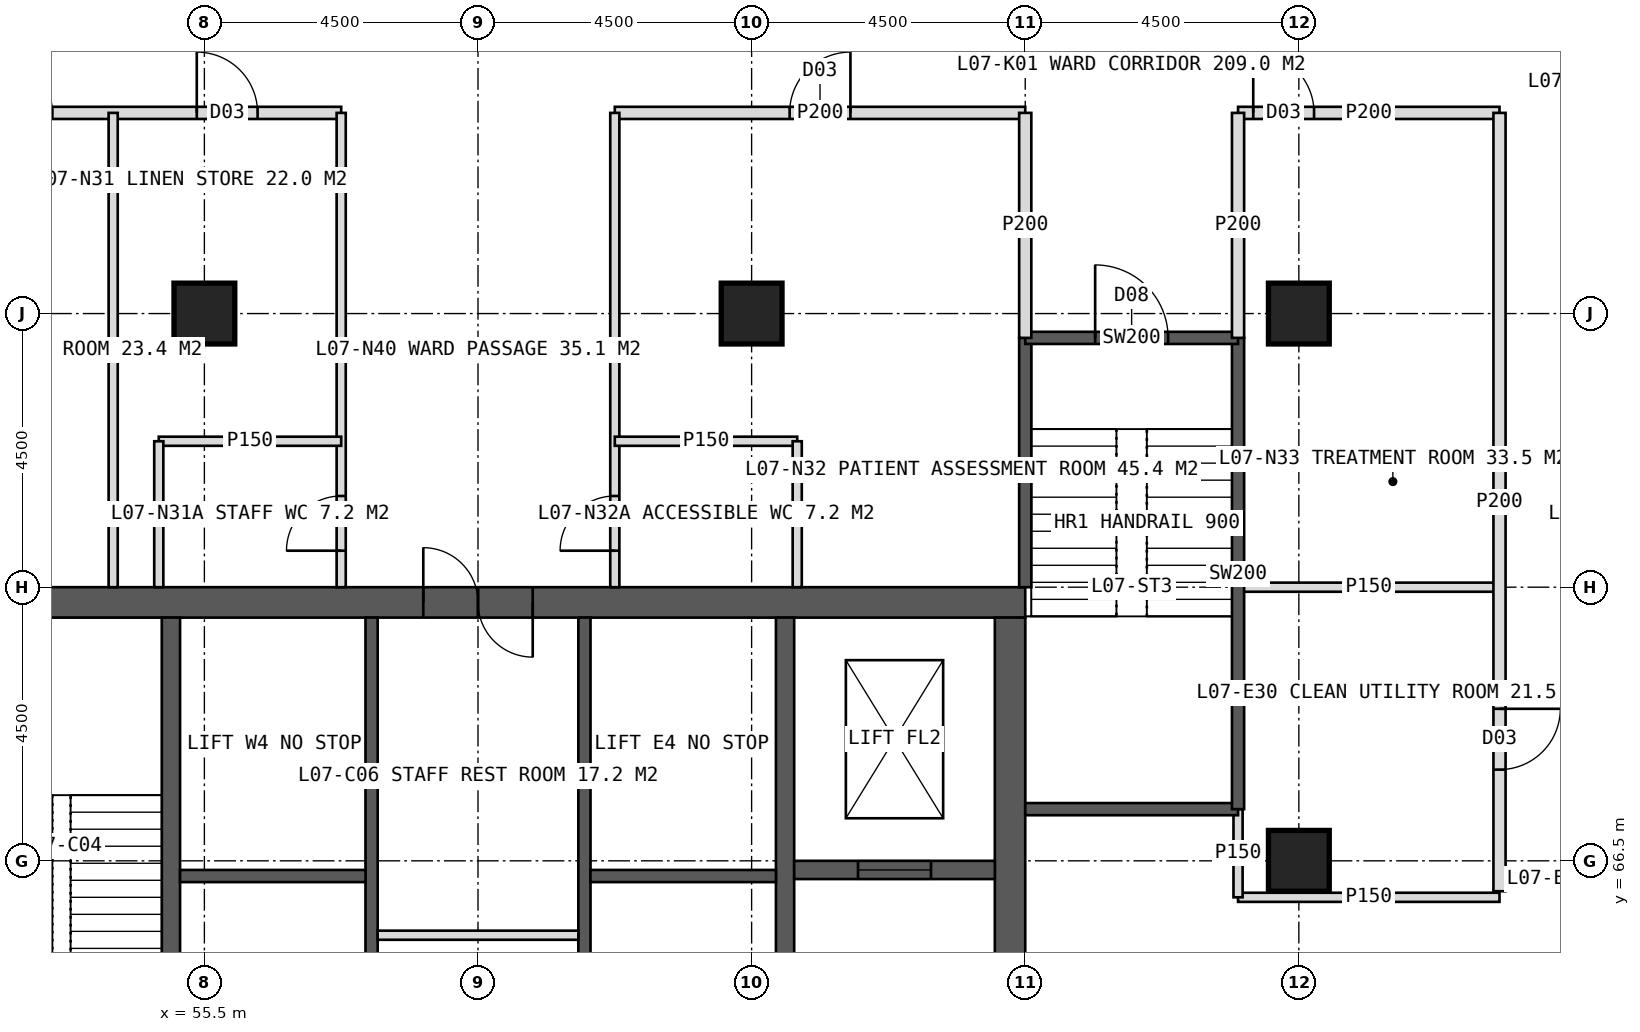
"""IFC4 building model, lengths in metres.
Left out: names, types, materials, properties, quantities, classifications, styles, units other than length and angle.
Written with IfcOpenShell. Run it as: python <this file> out.ifc"""

import sys

from ifc_helpers import new_model, si_unit, direction, frame, frame_2d, origin, origin_2d, place, context, subcontext, project, spatial, rectangle, hollow_rectangle, extrude, element, fill, save


model = new_model("IFC4")
c1 = context("Model", 3, precision=1e-05, world=origin(), true_north=direction((0.0, 1.0)))
c2 = subcontext(c1, "Body", "Model", "MODEL_VIEW")
j1 = project(units=[si_unit("LENGTHUNIT", "METRE"), si_unit("PLANEANGLEUNIT", "RADIAN")], contexts=[c1])
p1 = place(None, origin())
s1 = spatial("IfcSite", under=j1, at=p1, CompositionType="ELEMENT")
p2 = place(p1, origin())
s2 = spatial("IfcBuilding", under=s1, at=p2, CompositionType="ELEMENT")
p3 = place(p2, frame((0.0, 0.0, 35.0)))
s3 = spatial("IfcBuildingStorey", under=s2, at=p3, CompositionType="ELEMENT", Elevation=35.0)
p4 = place(p3, frame((51.0, 70.75, 0.0), z_axis=(0.0, 0.0, 1.0), x_axis=(1.0, 0.0, 0.0)))
e1 = element("IfcWall", 1, at=p4, inside=s3, PredefinedType="SHEAR", context=c2, shape_type="SweptSolid", body=[
    extrude(rectangle(XDim=18.0, YDim=0.5, at=frame_2d((9.0, 0.0))), origin(), (0.0, 0.0, 1.0), 4.0),
])
p5 = place(p4, frame((8.1, 0.0, 0.0)))
e2 = element("IfcOpeningElement", 2, at=p5, cuts=e1, PredefinedType="OPENING", context=c2, shape_type="SweptSolid", body=[
    extrude(rectangle(XDim=1.8, YDim=2.2, at=frame_2d((0.9, 1.1))), frame((0.0, 0.26, 0.0), z_axis=(0.0, -1.0, 0.0), x_axis=(1.0, 0.0, 0.0)), (0.0, 0.0, 1.0), 0.52),
])
p6 = place(p3, frame((68.75, 53.5, 0.0), z_axis=(0.0, 0.0, 1.0), x_axis=(0.0, 1.0, 0.0)))
e3 = element("IfcWall", 3, at=p6, inside=s3, PredefinedType="SHEAR", context=c2, shape_type="SweptSolid", body=[
    extrude(rectangle(XDim=17.0, YDim=0.5, at=frame_2d((8.5, 0.0))), origin(), (0.0, 0.0, 1.0), 4.0),
])
p7 = place(p6, frame((9.5, 0.0, 0.0)))
e4 = element("IfcOpeningElement", 4, at=p7, cuts=e3, PredefinedType="OPENING", context=c2, shape_type="SweptSolid", body=[
    extrude(rectangle(XDim=1.5, YDim=2.2, at=frame_2d((0.75, 1.1))), frame((0.0, 0.26, 0.0), z_axis=(0.0, -1.0, 0.0), x_axis=(1.0, 0.0, 0.0)), (0.0, 0.0, 1.0), 0.52),
])
for number, where, z_axis, x_axis in (
    (5, (54.95, 53.5, 0.0), (0.0, 0.0, 1.0), (0.0, 1.0, 0.0)),
    (6, (65.05, 53.5, 0.0), (0.0, 0.0, 1.0), (0.0, 1.0, 0.0)),
):
    element("IfcWall", number, at=place(p3, frame(where, z_axis=z_axis, x_axis=x_axis)), inside=s3, PredefinedType="SHEAR", context=c2, shape_type="SweptSolid", body=[
        extrude(rectangle(XDim=17.0, YDim=0.3, at=frame_2d((8.5, 0.0))), origin(), (0.0, 0.0, 1.0), 4.0),
    ])
p8 = place(p3, frame((58.25, 53.5, 0.0), z_axis=(0.0, 0.0, 1.0), x_axis=(0.0, 1.0, 0.0)))
e7 = element("IfcWall", 7, at=p8, inside=s3, PredefinedType="SHEAR", context=c2, shape_type="SweptSolid", body=[
    extrude(rectangle(XDim=17.0, YDim=0.2, at=frame_2d((8.5, 0.0))), origin(), (0.0, 0.0, 1.0), 4.0),
])
p9 = place(p8, frame((1.375, 0.0, 0.0)))
e8 = element("IfcOpeningElement", 8, at=p9, cuts=e7, PredefinedType="OPENING", context=c2, shape_type="SweptSolid", body=[
    extrude(rectangle(XDim=1.4, YDim=2.2, at=frame_2d((0.7, 1.1))), frame((0.0, 0.11, 0.0), z_axis=(0.0, -1.0, 0.0), x_axis=(1.0, 0.0, 0.0)), (0.0, 0.0, 1.0), 0.22),
])
p10 = place(p8, frame((5.675, 0.0, 0.0)))
e9 = element("IfcOpeningElement", 9, at=p10, cuts=e7, PredefinedType="OPENING", context=c2, shape_type="SweptSolid", body=[
    extrude(rectangle(XDim=1.4, YDim=2.2, at=frame_2d((0.7, 1.1))), frame((0.0, 0.11, 0.0), z_axis=(0.0, -1.0, 0.0), x_axis=(1.0, 0.0, 0.0)), (0.0, 0.0, 1.0), 0.22),
])
p11 = place(p3, frame((61.75, 53.5, 0.0), z_axis=(0.0, 0.0, 1.0), x_axis=(0.0, 1.0, 0.0)))
e10 = element("IfcWall", 10, at=p11, inside=s3, PredefinedType="SHEAR", context=c2, shape_type="SweptSolid", body=[
    extrude(rectangle(XDim=17.0, YDim=0.2, at=frame_2d((8.5, 0.0))), origin(), (0.0, 0.0, 1.0), 4.0),
])
p12 = place(p11, frame((1.375, 0.0, 0.0)))
e11 = element("IfcOpeningElement", 11, at=p12, cuts=e10, PredefinedType="OPENING", context=c2, shape_type="SweptSolid", body=[
    extrude(rectangle(XDim=1.4, YDim=2.2, at=frame_2d((0.7, 1.1))), frame((0.0, 0.11, 0.0), z_axis=(0.0, -1.0, 0.0), x_axis=(1.0, 0.0, 0.0)), (0.0, 0.0, 1.0), 0.22),
])
p13 = place(p11, frame((5.675, 0.0, 0.0)))
e12 = element("IfcOpeningElement", 12, at=p13, cuts=e10, PredefinedType="OPENING", context=c2, shape_type="SweptSolid", body=[
    extrude(rectangle(XDim=1.4, YDim=2.2, at=frame_2d((0.7, 1.1))), frame((0.0, 0.11, 0.0), z_axis=(0.0, -1.0, 0.0), x_axis=(1.0, 0.0, 0.0)), (0.0, 0.0, 1.0), 0.22),
])
for number, where, z_axis, x_axis in (
    (13, (55.1, 66.25, 0.0), (0.0, 0.0, 1.0), (1.0, 0.0, 0.0)),
    (14, (61.85, 66.25, 0.0), (0.0, 0.0, 1.0), (1.0, 0.0, 0.0)),
):
    element("IfcWall", number, at=place(p3, frame(where, z_axis=z_axis, x_axis=x_axis)), inside=s3, PredefinedType="SHEAR", context=c2, shape_type="SweptSolid", body=[
        extrude(rectangle(XDim=3.05, YDim=0.2, at=frame_2d((1.525, 0.0))), origin(), (0.0, 0.0, 1.0), 4.0),
    ])
p14 = place(p3, frame((65.2, 66.35, 0.0), z_axis=(0.0, 0.0, 1.0), x_axis=(1.0, 0.0, 0.0)))
e15 = element("IfcWall", 15, at=p14, inside=s3, PredefinedType="SHEAR", context=c2, shape_type="SweptSolid", body=[
    extrude(rectangle(XDim=3.3, YDim=0.3, at=frame_2d((1.65, 0.0))), origin(), (0.0, 0.0, 1.0), 4.0),
])
p15 = place(p14, frame((1.05, 0.0, 0.0)))
e16 = element("IfcOpeningElement", 16, at=p15, cuts=e15, PredefinedType="OPENING", context=c2, shape_type="SweptSolid", body=[
    extrude(rectangle(XDim=1.2, YDim=2.2, at=frame_2d((0.6, 1.1))), frame((0.0, 0.16, 0.0), z_axis=(0.0, -1.0, 0.0), x_axis=(1.0, 0.0, 0.0)), (0.0, 0.0, 1.0), 0.32),
])
for number, where, z_axis, x_axis in (
    (17, (73.5, 75.5, 0.0), (0.0, 0.0, 1.0), (1.0, 0.0, 0.0)),
    (18, (55.5, 75.5, 0.0), (0.0, 0.0, 1.0), (1.0, 0.0, 0.0)),
    (19, (64.5, 75.5, 0.0), (0.0, 0.0, 1.0), (1.0, 0.0, 0.0)),
    (20, (73.5, 66.5, 0.0), (0.0, 0.0, 1.0), (1.0, 0.0, 0.0)),
):
    element("IfcColumn", number, at=place(p3, frame(where, z_axis=z_axis, x_axis=x_axis)), inside=s3, PredefinedType="COLUMN", context=c2, shape_type="SweptSolid", body=[
        extrude(hollow_rectangle(XDim=1.0, YDim=1.0, WallThickness=0.1, at=origin_2d()), origin(), (0.0, 0.0, 1.0), 4.0),
    ])
p16 = place(p3, frame((43.2, 78.8, 0.0), z_axis=(0.0, 0.0, 1.0), x_axis=(1.0, 0.0, 0.0)))
e21 = element("IfcWall", 21, at=p16, inside=s3, PredefinedType="PARTITIONING", context=c2, shape_type="SweptSolid", body=[
    extrude(rectangle(XDim=14.55, YDim=0.2, at=frame_2d((7.275, 0.0))), origin(), (0.0, 0.0, 1.0), 3.75),
])
p17 = place(p16, frame((8.8, 0.0, 0.0)))
e22 = element("IfcOpeningElement", 22, at=p17, cuts=e21, PredefinedType="OPENING", context=c2, shape_type="SweptSolid", body=[
    extrude(rectangle(XDim=1.0, YDim=2.1, at=frame_2d((0.5, 1.05))), frame((0.0, 0.11, 0.0), z_axis=(0.0, -1.0, 0.0), x_axis=(1.0, 0.0, 0.0)), (0.0, 0.0, 1.0), 0.22),
])
p18 = place(p16, frame((12.175, 0.0, 0.0)))
e23 = element("IfcOpeningElement", 23, at=p18, cuts=e21, PredefinedType="OPENING", context=c2, shape_type="SweptSolid", body=[
    extrude(rectangle(XDim=1.0, YDim=2.1, at=frame_2d((0.5, 1.05))), frame((0.0, 0.11, 0.0), z_axis=(0.0, -1.0, 0.0), x_axis=(1.0, 0.0, 0.0)), (0.0, 0.0, 1.0), 0.22),
])
p19 = place(p3, frame((62.25, 78.8, 0.0), z_axis=(0.0, 0.0, 1.0), x_axis=(1.0, 0.0, 0.0)))
e24 = element("IfcWall", 24, at=p19, inside=s3, PredefinedType="PARTITIONING", context=c2, shape_type="SweptSolid", body=[
    extrude(rectangle(XDim=6.75, YDim=0.2, at=frame_2d((3.375, 0.0))), origin(), (0.0, 0.0, 1.0), 3.75),
])
p20 = place(p19, frame((2.875, 0.0, 0.0)))
e25 = element("IfcOpeningElement", 25, at=p20, cuts=e24, PredefinedType="OPENING", context=c2, shape_type="SweptSolid", body=[
    extrude(rectangle(XDim=1.0, YDim=2.1, at=frame_2d((0.5, 1.05))), frame((0.0, 0.11, 0.0), z_axis=(0.0, -1.0, 0.0), x_axis=(1.0, 0.0, 0.0)), (0.0, 0.0, 1.0), 0.22),
])
p21 = place(p3, frame((72.5, 78.8, 0.0), z_axis=(0.0, 0.0, 1.0), x_axis=(1.0, 0.0, 0.0)))
e26 = element("IfcWall", 26, at=p21, inside=s3, PredefinedType="PARTITIONING", context=c2, shape_type="SweptSolid", body=[
    extrude(rectangle(XDim=4.3, YDim=0.2, at=frame_2d((2.15, 0.0))), origin(), (0.0, 0.0, 1.0), 3.75),
])
p22 = place(p21, frame((0.25, 0.0, 0.0)))
e27 = element("IfcOpeningElement", 27, at=p22, cuts=e26, PredefinedType="OPENING", context=c2, shape_type="SweptSolid", body=[
    extrude(rectangle(XDim=1.0, YDim=2.1, at=frame_2d((0.5, 1.05))), frame((0.0, 0.11, 0.0), z_axis=(0.0, -1.0, 0.0), x_axis=(1.0, 0.0, 0.0)), (0.0, 0.0, 1.0), 0.22),
])
p23 = place(p3, frame((57.75, 71.0, 0.0), z_axis=(0.0, 0.0, 1.0), x_axis=(0.0, 1.0, 0.0)))
e28 = element("IfcWall", 28, at=p23, inside=s3, PredefinedType="PARTITIONING", context=c2, shape_type="SweptSolid", body=[
    extrude(rectangle(XDim=7.8, YDim=0.15, at=frame_2d((3.9, 0.0))), origin(), (0.0, 0.0, 1.0), 3.75),
])
p24 = place(p23, frame((0.6, 0.0, 0.0)))
e29 = element("IfcOpeningElement", 29, at=p24, cuts=e28, PredefinedType="OPENING", context=c2, shape_type="SweptSolid", body=[
    extrude(rectangle(XDim=0.9, YDim=2.1, at=frame_2d((0.45, 1.05))), frame((0.0, 0.085, 0.0), z_axis=(0.0, -1.0, 0.0), x_axis=(1.0, 0.0, 0.0)), (0.0, 0.0, 1.0), 0.17),
])
p25 = place(p3, frame((62.25, 71.0, 0.0), z_axis=(0.0, 0.0, 1.0), x_axis=(0.0, 1.0, 0.0)))
e30 = element("IfcWall", 30, at=p25, inside=s3, PredefinedType="PARTITIONING", context=c2, shape_type="SweptSolid", body=[
    extrude(rectangle(XDim=7.8, YDim=0.15, at=frame_2d((3.9, 0.0))), origin(), (0.0, 0.0, 1.0), 3.75),
])
p26 = place(p25, frame((0.6, 0.0, 0.0)))
e31 = element("IfcOpeningElement", 31, at=p26, cuts=e30, PredefinedType="OPENING", context=c2, shape_type="SweptSolid", body=[
    extrude(rectangle(XDim=0.9, YDim=2.1, at=frame_2d((0.45, 1.05))), frame((0.0, 0.085, 0.0), z_axis=(0.0, -1.0, 0.0), x_axis=(1.0, 0.0, 0.0)), (0.0, 0.0, 1.0), 0.17),
])
p27 = place(p3, frame((54.0, 71.0, 0.0), z_axis=(0.0, 0.0, 1.0), x_axis=(0.0, 1.0, 0.0)))
e32 = element("IfcWall", 32, at=p27, inside=s3, PredefinedType="PARTITIONING", context=c2, shape_type="SweptSolid", body=[
    extrude(rectangle(XDim=7.8, YDim=0.15, at=frame_2d((3.9, 0.0))), origin(), (0.0, 0.0, 1.0), 3.75),
])
p28 = place(p3, frame((54.75, 73.4, 0.0), z_axis=(0.0, 0.0, 1.0), x_axis=(1.0, 0.0, 0.0)))
e33 = element("IfcWall", 33, at=p28, inside=s3, PredefinedType="PARTITIONING", context=c2, shape_type="SweptSolid", body=[
    extrude(rectangle(XDim=3.0, YDim=0.15, at=frame_2d((1.5, 0.0))), origin(), (0.0, 0.0, 1.0), 3.75),
])
p29 = place(p3, frame((54.75, 71.0, 0.0), z_axis=(0.0, 0.0, 1.0), x_axis=(0.0, 1.0, 0.0)))
e34 = element("IfcWall", 34, at=p29, inside=s3, PredefinedType="PARTITIONING", context=c2, shape_type="SweptSolid", body=[
    extrude(rectangle(XDim=2.4, YDim=0.15, at=frame_2d((1.2, 0.0))), origin(), (0.0, 0.0, 1.0), 3.75),
])
p30 = place(p3, frame((62.25, 73.4, 0.0), z_axis=(0.0, 0.0, 1.0), x_axis=(1.0, 0.0, 0.0)))
e35 = element("IfcWall", 35, at=p30, inside=s3, PredefinedType="PARTITIONING", context=c2, shape_type="SweptSolid", body=[
    extrude(rectangle(XDim=3.0, YDim=0.15, at=frame_2d((1.5, 0.0))), origin(), (0.0, 0.0, 1.0), 3.75),
])
p31 = place(p3, frame((65.25, 71.0, 0.0), z_axis=(0.0, 0.0, 1.0), x_axis=(0.0, 1.0, 0.0)))
e36 = element("IfcWall", 36, at=p31, inside=s3, PredefinedType="PARTITIONING", context=c2, shape_type="SweptSolid", body=[
    extrude(rectangle(XDim=2.4, YDim=0.15, at=frame_2d((1.2, 0.0))), origin(), (0.0, 0.0, 1.0), 3.75),
])
p32 = place(p3, frame((72.5, 71.0, 0.0), z_axis=(0.0, 0.0, 1.0), x_axis=(1.0, 0.0, 0.0)))
e37 = element("IfcWall", 37, at=p32, inside=s3, PredefinedType="PARTITIONING", context=c2, shape_type="SweptSolid", body=[
    extrude(rectangle(XDim=4.3, YDim=0.15, at=frame_2d((2.15, 0.0))), origin(), (0.0, 0.0, 1.0), 3.75),
])
p33 = place(p3, frame((76.8, 78.8, 0.0), z_axis=(0.0, 0.0, 1.0), x_axis=(0.0, -1.0, 0.0)))
e38 = element("IfcWall", 38, at=p33, inside=s3, PredefinedType="PARTITIONING", context=c2, shape_type="SweptSolid", body=[
    extrude(rectangle(XDim=12.8, YDim=0.2, at=frame_2d((6.4, 0.0))), origin(), (0.0, 0.0, 1.0), 3.75),
])
p34 = place(p33, frame((9.8, 0.0, 0.0)))
e39 = element("IfcOpeningElement", 39, at=p34, cuts=e38, PredefinedType="OPENING", context=c2, shape_type="SweptSolid", body=[
    extrude(rectangle(XDim=1.0, YDim=2.1, at=frame_2d((0.5, 1.05))), frame((0.0, 0.11, 0.0), z_axis=(0.0, -1.0, 0.0), x_axis=(1.0, 0.0, 0.0)), (0.0, 0.0, 1.0), 0.22),
])
p35 = place(p3, frame((72.5, 65.9, 0.0), z_axis=(0.0, 0.0, 1.0), x_axis=(1.0, 0.0, 0.0)))
e40 = element("IfcWall", 40, at=p35, inside=s3, PredefinedType="PARTITIONING", context=c2, shape_type="SweptSolid", body=[
    extrude(rectangle(XDim=4.3, YDim=0.15, at=frame_2d((2.15, 0.0))), origin(), (0.0, 0.0, 1.0), 3.75),
])
p36 = place(p3, frame((58.35, 65.277, 0.0), z_axis=(0.0, 0.0, 1.0), x_axis=(1.0, 0.0, 0.0)))
e41 = element("IfcWall", 41, at=p36, inside=s3, PredefinedType="PARTITIONING", context=c2, shape_type="SweptSolid", body=[
    extrude(rectangle(XDim=3.3, YDim=0.15, at=frame_2d((1.65, 0.0))), origin(), (0.0, 0.0, 1.0), 3.75),
])
p37 = place(p3, frame((72.5, 65.9, 0.0), z_axis=(0.0, 0.0, 1.0), x_axis=(0.0, 1.0, 0.0)))
e42 = element("IfcWall", 42, at=p37, inside=s3, PredefinedType="PARTITIONING", context=c2, shape_type="SweptSolid", body=[
    extrude(rectangle(XDim=1.45, YDim=0.15, at=frame_2d((0.725, 0.0))), origin(), (0.0, 0.0, 1.0), 3.75),
])
p38 = place(p3, frame((69.0, 71.0, 0.0), z_axis=(0.0, 0.0, 1.0), x_axis=(0.0, 1.0, 0.0)))
e43 = element("IfcWall", 43, at=p38, inside=s3, PredefinedType="SOLIDWALL", context=c2, shape_type="SweptSolid", body=[
    extrude(rectangle(XDim=4.1, YDim=0.2, at=frame_2d((2.05, 0.0))), origin(), (0.0, 0.0, 1.0), 3.75),
])
p39 = place(p3, frame((69.0, 67.35, 0.0), z_axis=(0.0, 0.0, 1.0), x_axis=(1.0, 0.0, 0.0)))
e44 = element("IfcWall", 44, at=p39, inside=s3, PredefinedType="SOLIDWALL", context=c2, shape_type="SweptSolid", body=[
    extrude(rectangle(XDim=3.5, YDim=0.2, at=frame_2d((1.75, 0.0))), origin(), (0.0, 0.0, 1.0), 3.75),
])
p40 = place(p3, frame((72.5, 67.35, 0.0), z_axis=(0.0, 0.0, 1.0), x_axis=(0.0, 1.0, 0.0)))
e45 = element("IfcWall", 45, at=p40, inside=s3, PredefinedType="SOLIDWALL", context=c2, shape_type="SweptSolid", body=[
    extrude(rectangle(XDim=7.75, YDim=0.2, at=frame_2d((3.875, 0.0))), origin(), (0.0, 0.0, 1.0), 3.75),
])
p41 = place(p3, frame((69.0, 75.1, 0.0), z_axis=(0.0, 0.0, 1.0), x_axis=(1.0, 0.0, 0.0)))
e46 = element("IfcWall", 46, at=p41, inside=s3, PredefinedType="SOLIDWALL", context=c2, shape_type="SweptSolid", body=[
    extrude(rectangle(XDim=3.5, YDim=0.2, at=frame_2d((1.75, 0.0))), origin(), (0.0, 0.0, 1.0), 3.75),
])
p42 = place(p41, frame((1.15, 0.0, 0.0)))
e47 = element("IfcOpeningElement", 47, at=p42, cuts=e46, PredefinedType="OPENING", context=c2, shape_type="SweptSolid", body=[
    extrude(rectangle(XDim=1.2, YDim=2.1, at=frame_2d((0.6, 1.05))), frame((0.0, 0.11, 0.0), z_axis=(0.0, -1.0, 0.0), x_axis=(1.0, 0.0, 0.0)), (0.0, 0.0, 1.0), 0.22),
])
for number, where, z_axis, x_axis in (
    (48, (69.0, 75.1, 0.0), (0.0, 0.0, 1.0), (0.0, 1.0, 0.0)),
    (49, (72.5, 75.1, 0.0), (0.0, 0.0, 1.0), (0.0, 1.0, 0.0)),
):
    element("IfcWall", number, at=place(p3, frame(where, z_axis=z_axis, x_axis=x_axis)), inside=s3, PredefinedType="PARTITIONING", context=c2, shape_type="SweptSolid", body=[
        extrude(rectangle(XDim=3.7, YDim=0.2, at=frame_2d((1.85, 0.0))), origin(), (0.0, 0.0, 1.0), 3.75),
    ])
p43 = place(p24, origin())
e50 = element("IfcDoor", 50, at=p43, inside=s3, OperationType="SINGLE_SWING_LEFT", PredefinedType="DOOR", context=c2, shape_type="SweptSolid", body=[
    extrude(rectangle(XDim=0.9, YDim=2.1, at=frame_2d((0.45, 1.05))), frame((0.0, 0.025, 0.0), z_axis=(0.0, -1.0, 0.0), x_axis=(1.0, 0.0, 0.0)), (0.0, 0.0, 1.0), 0.05),
])
fill(e29, e50)
p44 = place(p18, origin())
e51 = element("IfcDoor", 51, at=p44, inside=s3, OperationType="SINGLE_SWING_LEFT", PredefinedType="DOOR", context=c2, shape_type="SweptSolid", body=[
    extrude(rectangle(XDim=1.0, YDim=2.1, at=frame_2d((0.5, 1.05))), frame((0.0, 0.025, 0.0), z_axis=(0.0, -1.0, 0.0), x_axis=(1.0, 0.0, 0.0)), (0.0, 0.0, 1.0), 0.05),
])
fill(e23, e51)
p45 = place(p26, origin())
e52 = element("IfcDoor", 52, at=p45, inside=s3, OperationType="SINGLE_SWING_LEFT", PredefinedType="DOOR", context=c2, shape_type="SweptSolid", body=[
    extrude(rectangle(XDim=0.9, YDim=2.1, at=frame_2d((0.45, 1.05))), frame((0.0, 0.025, 0.0), z_axis=(0.0, -1.0, 0.0), x_axis=(1.0, 0.0, 0.0)), (0.0, 0.0, 1.0), 0.05),
])
fill(e31, e52)
p46 = place(p20, origin())
e53 = element("IfcDoor", 53, at=p46, inside=s3, OperationType="SINGLE_SWING_RIGHT", PredefinedType="DOOR", context=c2, shape_type="SweptSolid", body=[
    extrude(rectangle(XDim=1.0, YDim=2.1, at=frame_2d((0.5, 1.05))), frame((0.0, 0.025, 0.0), z_axis=(0.0, -1.0, 0.0), x_axis=(1.0, 0.0, 0.0)), (0.0, 0.0, 1.0), 0.05),
])
fill(e25, e53)
p47 = place(p22, origin())
e54 = element("IfcDoor", 54, at=p47, inside=s3, OperationType="SINGLE_SWING_LEFT", PredefinedType="DOOR", context=c2, shape_type="SweptSolid", body=[
    extrude(rectangle(XDim=1.0, YDim=2.1, at=frame_2d((0.5, 1.05))), frame((0.0, 0.025, 0.0), z_axis=(0.0, -1.0, 0.0), x_axis=(1.0, 0.0, 0.0)), (0.0, 0.0, 1.0), 0.05),
])
fill(e27, e54)
p48 = place(p34, origin())
e55 = element("IfcDoor", 55, at=p48, inside=s3, OperationType="SINGLE_SWING_LEFT", PredefinedType="DOOR", context=c2, shape_type="SweptSolid", body=[
    extrude(rectangle(XDim=1.0, YDim=2.1, at=frame_2d((0.5, 1.05))), frame((0.0, 0.025, 0.0), z_axis=(0.0, -1.0, 0.0), x_axis=(1.0, 0.0, 0.0)), (0.0, 0.0, 1.0), 0.05),
])
fill(e39, e55)
p49 = place(p15, origin())
e56 = element("IfcDoor", 56, at=p49, inside=s3, OperationType="SLIDING_TO_LEFT", PredefinedType="DOOR", context=c2, shape_type="SweptSolid", body=[
    extrude(rectangle(XDim=1.2, YDim=2.2, at=frame_2d((0.6, 1.1))), frame((0.0, 0.025, 0.0), z_axis=(0.0, -1.0, 0.0), x_axis=(1.0, 0.0, 0.0)), (0.0, 0.0, 1.0), 0.05),
])
fill(e16, e56)
p50 = place(p5, origin())
e57 = element("IfcDoor", 57, at=p50, inside=s3, OperationType="DOUBLE_DOOR_SINGLE_SWING", PredefinedType="DOOR", context=c2, shape_type="SweptSolid", body=[
    extrude(rectangle(XDim=1.8, YDim=2.2, at=frame_2d((0.9, 1.1))), frame((0.0, 0.025, 0.0), z_axis=(0.0, -1.0, 0.0), x_axis=(1.0, 0.0, 0.0)), (0.0, 0.0, 1.0), 0.05),
])
fill(e2, e57)
p51 = place(p42, origin())
e58 = element("IfcDoor", 58, at=p51, inside=s3, OperationType="SINGLE_SWING_LEFT", PredefinedType="DOOR", context=c2, shape_type="SweptSolid", body=[
    extrude(rectangle(XDim=1.2, YDim=2.1, at=frame_2d((0.6, 1.05))), frame((0.0, 0.025, 0.0), z_axis=(0.0, -1.0, 0.0), x_axis=(1.0, 0.0, 0.0)), (0.0, 0.0, 1.0), 0.05),
])
fill(e47, e58)
save(model, sys.argv[1])
